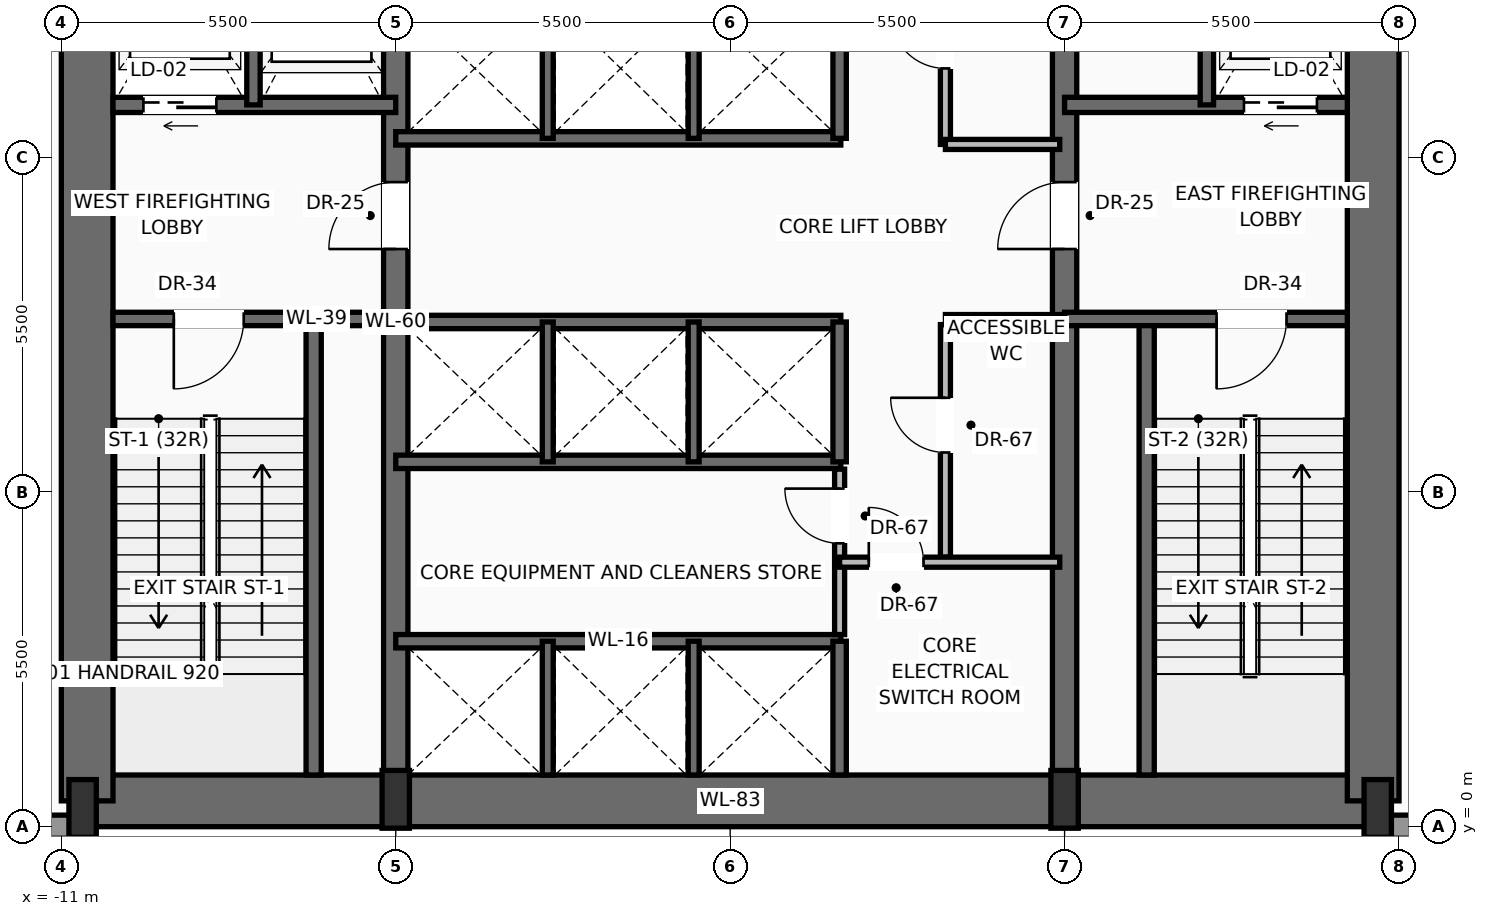
"""IFC4 building model, lengths in metres.
Left out: names, types, materials, properties, quantities, classifications, styles, units other than length and angle.
Written with IfcOpenShell. Run it as: python <this file> out.ifc"""

import sys

from ifc_helpers import new_model, si_unit, direction, frame, frame_2d, origin, origin_2d, place, context, subcontext, project, spatial, rectangle, extrude, source, transform, mapped, element, fill, save


model = new_model("IFC4")
c1 = context("Model", 3, precision=1e-05, world=origin(), true_north=direction((0.0, 1.0)))
c2 = subcontext(c1, "Body", "Model", "MODEL_VIEW")
j1 = project(units=[si_unit("LENGTHUNIT", "METRE"), si_unit("PLANEANGLEUNIT", "RADIAN")], contexts=[c1])
p1 = place(None, origin())
s1 = spatial("IfcSite", under=j1, at=p1, CompositionType="ELEMENT")
p2 = place(p1, origin())
s2 = spatial("IfcBuilding", under=s1, at=p2, CompositionType="ELEMENT")
p3 = place(p2, frame((0.0, 0.0, 16.5)))
s3 = spatial("IfcBuildingStorey", under=s2, at=p3, CompositionType="ELEMENT", Elevation=16.5)
p4 = place(p3, frame((-10.65, 0.425, 0.0), z_axis=(0.0, 0.0, 1.0), x_axis=(1.0, 0.0, 0.0)))
e1 = element("IfcWall", 1, at=p4, inside=s3, PredefinedType="SHEAR", context=c2, shape_type="SweptSolid", body=[
    extrude(rectangle(XDim=21.3, YDim=0.85, at=frame_2d((10.65, 0.0))), origin(), (0.0, 0.0, 1.0), 5.05),
])
for number, where, z_axis, x_axis in (
    (2, (-10.575, 0.425, 0.0), (0.0, 0.0, 1.0), (0.0, 1.0, 0.0)),
    (3, (10.575, 0.425, 0.0), (0.0, 0.0, 1.0), (0.0, 1.0, 0.0)),
):
    element("IfcWall", number, at=place(p3, frame(where, z_axis=z_axis, x_axis=x_axis)), inside=s3, PredefinedType="SHEAR", context=c2, shape_type="SweptSolid", body=[
        extrude(rectangle(XDim=15.75, YDim=0.85, at=frame_2d((7.875, 0.0))), origin(), (0.0, 0.0, 1.0), 5.05),
    ])
p5 = place(p3, frame((-5.5, 0.425, 0.0), z_axis=(0.0, 0.0, 1.0), x_axis=(0.0, 1.0, 0.0)))
e4 = element("IfcWall", 4, at=p5, inside=s3, PredefinedType="SHEAR", context=c2, shape_type="SweptSolid", body=[
    extrude(rectangle(XDim=15.75, YDim=0.4, at=frame_2d((7.875, 0.0))), origin(), (0.0, 0.0, 1.0), 5.05),
])
p6 = place(p5, frame((9.075, 0.0, 0.0)))
e5 = element("IfcOpeningElement", 5, at=p6, cuts=e4, PredefinedType="OPENING", context=c2, shape_type="SweptSolid", body=[
    extrude(rectangle(XDim=1.1, YDim=2.2, at=frame_2d((0.55, 1.1))), frame((0.0, 0.21, 0.0), z_axis=(0.0, -1.0, 0.0), x_axis=(1.0, 0.0, 0.0)), (0.0, 0.0, 1.0), 0.42),
])
p7 = place(p3, frame((5.5, 0.425, 0.0), z_axis=(0.0, 0.0, 1.0), x_axis=(0.0, 1.0, 0.0)))
e6 = element("IfcWall", 6, at=p7, inside=s3, PredefinedType="SHEAR", context=c2, shape_type="SweptSolid", body=[
    extrude(rectangle(XDim=15.75, YDim=0.4, at=frame_2d((7.875, 0.0))), origin(), (0.0, 0.0, 1.0), 5.05),
])
p8 = place(p7, frame((9.075, 0.0, 0.0)))
e7 = element("IfcOpeningElement", 7, at=p8, cuts=e6, PredefinedType="OPENING", context=c2, shape_type="SweptSolid", body=[
    extrude(rectangle(XDim=1.1, YDim=2.2, at=frame_2d((0.55, 1.1))), frame((0.0, 0.21, 0.0), z_axis=(0.0, -1.0, 0.0), x_axis=(1.0, 0.0, 0.0)), (0.0, 0.0, 1.0), 0.42),
])
m1 = source(origin(), c2, "Body", "SweptSolid", [
    extrude(rectangle(XDim=0.45, YDim=0.95, at=origin_2d()), origin(), (0.0, 0.0, 1.0), 5.5),
])
for number, where, z_axis, x_axis in (
    (8, (-10.65, 0.3, 0.0), (0.0, 0.0, 1.0), (1.0, 0.0, 0.0)),
    (9, (-5.5, 0.45, 0.0), (0.0, 0.0, 1.0), (1.0, 0.0, 0.0)),
    (10, (5.5, 0.45, 0.0), (0.0, 0.0, 1.0), (1.0, 0.0, 0.0)),
    (11, (10.65, 0.3, 0.0), (0.0, 0.0, 1.0), (1.0, 0.0, 0.0)),
):
    element("IfcColumn", number, at=place(p3, frame(where, z_axis=z_axis, x_axis=x_axis)), inside=s3, PredefinedType="PILASTER", context=c2, shape_type="MappedRepresentation", body=[
        mapped(m1, transform((0.0, 0.0, 0.0), scale=1.0)),
    ])
p9 = place(p3, frame((24.85, 0.0, 0.0), z_axis=(0.0, 0.0, 1.0), x_axis=(-1.0, 0.0, 0.0)))
e12 = element("IfcWall", 12, at=p9, inside=s3, PredefinedType="SOLIDWALL", context=c2, shape_type="SweptSolid", body=[
    extrude(rectangle(XDim=14.3, YDim=0.38, at=frame_2d((7.15, 0.0))), origin(), (0.0, 0.0, 1.0), 3.99),
])
p10 = place(p9, frame((6.25, 0.0, 0.95)))
e13 = element("IfcOpeningElement", 13, at=p10, cuts=e12, PredefinedType="OPENING", context=c2, shape_type="SweptSolid", body=[
    extrude(rectangle(XDim=1.8, YDim=2.4, at=frame_2d((0.9, 1.2))), frame((0.0, 0.2, 0.0), z_axis=(0.0, -1.0, 0.0), x_axis=(1.0, 0.0, 0.0)), (0.0, 0.0, 1.0), 0.4),
])
p11 = place(p3, frame((-10.55, 0.0, 0.0), z_axis=(0.0, 0.0, 1.0), x_axis=(-1.0, 0.0, 0.0)))
e14 = element("IfcWall", 14, at=p11, inside=s3, PredefinedType="SOLIDWALL", context=c2, shape_type="SweptSolid", body=[
    extrude(rectangle(XDim=14.3, YDim=0.38, at=frame_2d((7.15, 0.0))), origin(), (0.0, 0.0, 1.0), 3.99),
])
p12 = place(p11, frame((6.25, 0.0, 0.95)))
e15 = element("IfcOpeningElement", 15, at=p12, cuts=e14, PredefinedType="OPENING", context=c2, shape_type="SweptSolid", body=[
    extrude(rectangle(XDim=1.8, YDim=2.4, at=frame_2d((0.9, 1.2))), frame((0.0, 0.2, 0.0), z_axis=(0.0, -1.0, 0.0), x_axis=(1.0, 0.0, 0.0)), (0.0, 0.0, 1.0), 0.4),
])
p13 = place(p3, frame((-6.85, 0.85, 0.0), z_axis=(0.0, 0.0, 1.0), x_axis=(0.0, 1.0, 0.0)))
e16 = element("IfcWall", 16, at=p13, inside=s3, PredefinedType="SOLIDWALL", context=c2, shape_type="SweptSolid", body=[
    extrude(rectangle(XDim=7.5, YDim=0.25, at=frame_2d((3.75, 0.0))), origin(), (0.0, 0.0, 1.0), 5.05),
])
p14 = place(p3, frame((-5.5, 8.35, 0.0), z_axis=(0.0, 0.0, 1.0), x_axis=(-1.0, 0.0, 0.0)))
e17 = element("IfcWall", 17, at=p14, inside=s3, PredefinedType="SOLIDWALL", context=c2, shape_type="SweptSolid", body=[
    extrude(rectangle(XDim=4.65, YDim=0.22, at=frame_2d((2.325, 0.0))), origin(), (0.0, 0.0, 1.0), 5.05),
])
p15 = place(p14, frame((2.5, 0.0, 0.0)))
e18 = element("IfcOpeningElement", 18, at=p15, cuts=e17, PredefinedType="OPENING", context=c2, shape_type="SweptSolid", body=[
    extrude(rectangle(XDim=1.15, YDim=2.2, at=frame_2d((0.575, 1.1))), frame((0.0, 0.12, 0.0), z_axis=(0.0, -1.0, 0.0), x_axis=(1.0, 0.0, 0.0)), (0.0, 0.0, 1.0), 0.24),
])
p16 = place(p3, frame((-5.5, 11.87, 0.0), z_axis=(0.0, 0.0, 1.0), x_axis=(-1.0, 0.0, 0.0)))
e19 = element("IfcWall", 19, at=p16, inside=s3, PredefinedType="SOLIDWALL", context=c2, shape_type="SweptSolid", body=[
    extrude(rectangle(XDim=4.65, YDim=0.25, at=frame_2d((2.325, 0.0))), origin(), (0.0, 0.0, 1.0), 5.05),
])
p17 = place(p16, frame((2.95, 0.0, 0.0)))
e20 = element("IfcOpeningElement", 20, at=p17, cuts=e19, PredefinedType="OPENING", context=c2, shape_type="SweptSolid", body=[
    extrude(rectangle(XDim=1.2, YDim=2.25, at=frame_2d((0.6, 1.125))), frame((0.0, 0.135, 0.0), z_axis=(0.0, -1.0, 0.0), x_axis=(1.0, 0.0, 0.0)), (0.0, 0.0, 1.0), 0.27),
])
p18 = place(p3, frame((-7.84, 11.87, 0.0), z_axis=(0.0, 0.0, 1.0), x_axis=(0.0, 1.0, 0.0)))
e21 = element("IfcWall", 21, at=p18, inside=s3, PredefinedType="SOLIDWALL", context=c2, shape_type="SweptSolid", body=[
    extrude(rectangle(XDim=3.88, YDim=0.22, at=frame_2d((1.94, 0.0))), origin(), (0.0, 0.0, 1.0), 5.05),
])
p19 = place(p3, frame((6.85, 0.85, 0.0), z_axis=(0.0, 0.0, 1.0), x_axis=(0.0, 1.0, 0.0)))
e22 = element("IfcWall", 22, at=p19, inside=s3, PredefinedType="SOLIDWALL", context=c2, shape_type="SweptSolid", body=[
    extrude(rectangle(XDim=7.5, YDim=0.25, at=frame_2d((3.75, 0.0))), origin(), (0.0, 0.0, 1.0), 5.05),
])
p20 = place(p3, frame((10.15, 8.35, 0.0), z_axis=(0.0, 0.0, 1.0), x_axis=(-1.0, 0.0, 0.0)))
e23 = element("IfcWall", 23, at=p20, inside=s3, PredefinedType="SOLIDWALL", context=c2, shape_type="SweptSolid", body=[
    extrude(rectangle(XDim=4.65, YDim=0.22, at=frame_2d((2.325, 0.0))), origin(), (0.0, 0.0, 1.0), 5.05),
])
p21 = place(p20, frame((1.0, 0.0, 0.0)))
e24 = element("IfcOpeningElement", 24, at=p21, cuts=e23, PredefinedType="OPENING", context=c2, shape_type="SweptSolid", body=[
    extrude(rectangle(XDim=1.15, YDim=2.2, at=frame_2d((0.575, 1.1))), frame((0.0, 0.12, 0.0), z_axis=(0.0, -1.0, 0.0), x_axis=(1.0, 0.0, 0.0)), (0.0, 0.0, 1.0), 0.24),
])
p22 = place(p3, frame((10.15, 11.87, 0.0), z_axis=(0.0, 0.0, 1.0), x_axis=(-1.0, 0.0, 0.0)))
e25 = element("IfcWall", 25, at=p22, inside=s3, PredefinedType="SOLIDWALL", context=c2, shape_type="SweptSolid", body=[
    extrude(rectangle(XDim=4.65, YDim=0.25, at=frame_2d((2.325, 0.0))), origin(), (0.0, 0.0, 1.0), 5.05),
])
p23 = place(p22, frame((0.5, 0.0, 0.0)))
e26 = element("IfcOpeningElement", 26, at=p23, cuts=e25, PredefinedType="OPENING", context=c2, shape_type="SweptSolid", body=[
    extrude(rectangle(XDim=1.2, YDim=2.25, at=frame_2d((0.6, 1.125))), frame((0.0, 0.135, 0.0), z_axis=(0.0, -1.0, 0.0), x_axis=(1.0, 0.0, 0.0)), (0.0, 0.0, 1.0), 0.27),
])
p24 = place(p3, frame((7.84, 11.87, 0.0), z_axis=(0.0, 0.0, 1.0), x_axis=(0.0, 1.0, 0.0)))
e27 = element("IfcWall", 27, at=p24, inside=s3, PredefinedType="SOLIDWALL", context=c2, shape_type="SweptSolid", body=[
    extrude(rectangle(XDim=3.88, YDim=0.22, at=frame_2d((1.94, 0.0))), origin(), (0.0, 0.0, 1.0), 5.05),
])
p25 = place(p3, frame((-5.5, 3.05, 0.0), z_axis=(0.0, 0.0, 1.0), x_axis=(1.0, 0.0, 0.0)))
e28 = element("IfcWall", 28, at=p25, inside=s3, PredefinedType="SOLIDWALL", context=c2, shape_type="SweptSolid", body=[
    extrude(rectangle(XDim=7.32, YDim=0.22, at=frame_2d((3.66, 0.0))), origin(), (0.0, 0.0, 1.0), 5.05),
])
p26 = place(p3, frame((1.8, 0.85, 0.0), z_axis=(0.0, 0.0, 1.0), x_axis=(0.0, 1.0, 0.0)))
e29 = element("IfcWall", 29, at=p26, inside=s3, PredefinedType="SOLIDWALL", context=c2, shape_type="SweptSolid", body=[
    extrude(rectangle(XDim=2.2, YDim=0.22, at=frame_2d((1.1, 0.0))), origin(), (0.0, 0.0, 1.0), 5.05),
])
for number, where, z_axis, x_axis in (
    (30, (-3.0, 0.85, 0.0), (0.0, 0.0, 1.0), (0.0, 1.0, 0.0)),
    (31, (-0.6, 0.85, 0.0), (0.0, 0.0, 1.0), (0.0, 1.0, 0.0)),
):
    element("IfcWall", number, at=place(p3, frame(where, z_axis=z_axis, x_axis=x_axis)), inside=s3, PredefinedType="SOLIDWALL", context=c2, shape_type="SweptSolid", body=[
        extrude(rectangle(XDim=2.2, YDim=0.18, at=frame_2d((1.1, 0.0))), origin(), (0.0, 0.0, 1.0), 5.05),
    ])
p27 = place(p3, frame((1.8, 3.16, 0.0), z_axis=(0.0, 0.0, 1.0), x_axis=(0.0, 1.0, 0.0)))
e32 = element("IfcWall", 32, at=p27, inside=s3, PredefinedType="PARTITIONING", context=c2, shape_type="SweptSolid", body=[
    extrude(rectangle(XDim=2.72, YDim=0.165, at=frame_2d((1.36, 0.0))), origin(), (0.0, 0.0, 1.0), 5.042),
])
p28 = place(p27, frame((1.5, 0.0, 0.0)))
e33 = element("IfcOpeningElement", 33, at=p28, cuts=e32, PredefinedType="OPENING", context=c2, shape_type="SweptSolid", body=[
    extrude(rectangle(XDim=0.9, YDim=2.1, at=frame_2d((0.45, 1.05))), frame((0.0, 0.093, 0.0), z_axis=(0.0, -1.0, 0.0), x_axis=(1.0, 0.0, 0.0)), (0.0, 0.0, 1.0), 0.185),
])
p29 = place(p3, frame((3.54, 4.433, 0.0), z_axis=(0.0, 0.0, 1.0), x_axis=(0.0, 1.0, 0.0)))
e34 = element("IfcWall", 34, at=p29, inside=s3, PredefinedType="PARTITIONING", context=c2, shape_type="SweptSolid", body=[
    extrude(rectangle(XDim=3.825, YDim=0.165, at=frame_2d((1.913, 0.0))), origin(), (0.0, 0.0, 1.0), 5.042),
])
p30 = place(p29, frame((1.721, 0.0, 0.0)))
e35 = element("IfcOpeningElement", 35, at=p30, cuts=e34, PredefinedType="OPENING", context=c2, shape_type="SweptSolid", body=[
    extrude(rectangle(XDim=0.9, YDim=2.1, at=frame_2d((0.45, 1.05))), frame((0.0, 0.093, 0.0), z_axis=(0.0, -1.0, 0.0), x_axis=(1.0, 0.0, 0.0)), (0.0, 0.0, 1.0), 0.185),
])
p31 = place(p3, frame((3.54, 8.34, 0.0), z_axis=(0.0, 0.0, 1.0), x_axis=(1.0, 0.0, 0.0)))
e36 = element("IfcWall", 36, at=p31, inside=s3, PredefinedType="PARTITIONING", context=c2, shape_type="SweptSolid", body=[
    extrude(rectangle(XDim=1.88, YDim=0.165, at=frame_2d((0.94, 0.0))), origin(), (0.0, 0.0, 1.0), 5.042),
])
p32 = place(p3, frame((1.8, 4.35, 0.0), z_axis=(0.0, 0.0, 1.0), x_axis=(1.0, 0.0, 0.0)))
e37 = element("IfcWall", 37, at=p32, inside=s3, PredefinedType="PARTITIONING", context=c2, shape_type="SweptSolid", body=[
    extrude(rectangle(XDim=3.62, YDim=0.165, at=frame_2d((1.81, 0.0))), origin(), (0.0, 0.0, 1.0), 5.042),
])
p33 = place(p32, frame((0.48, 0.0, 0.0)))
e38 = element("IfcOpeningElement", 38, at=p33, cuts=e37, PredefinedType="OPENING", context=c2, shape_type="SweptSolid", body=[
    extrude(rectangle(XDim=0.9, YDim=2.1, at=frame_2d((0.45, 1.05))), frame((0.0, 0.093, 0.0), z_axis=(0.0, -1.0, 0.0), x_axis=(1.0, 0.0, 0.0)), (0.0, 0.0, 1.0), 0.185),
])
for number, where, z_axis, x_axis in (
    (39, (-5.5, 6.0, 0.0), (0.0, 0.0, 1.0), (1.0, 0.0, 0.0)),
    (40, (-5.5, 8.3, 0.0), (0.0, 0.0, 1.0), (1.0, 0.0, 0.0)),
):
    element("IfcWall", number, at=place(p3, frame(where, z_axis=z_axis, x_axis=x_axis)), inside=s3, PredefinedType="SOLIDWALL", context=c2, shape_type="SweptSolid", body=[
        extrude(rectangle(XDim=7.32, YDim=0.22, at=frame_2d((3.66, 0.0))), origin(), (0.0, 0.0, 1.0), 5.05),
    ])
p34 = place(p3, frame((1.8, 6.0, 0.0), z_axis=(0.0, 0.0, 1.0), x_axis=(0.0, 1.0, 0.0)))
e41 = element("IfcWall", 41, at=p34, inside=s3, PredefinedType="SOLIDWALL", context=c2, shape_type="SweptSolid", body=[
    extrude(rectangle(XDim=2.3, YDim=0.22, at=frame_2d((1.15, 0.0))), origin(), (0.0, 0.0, 1.0), 5.05),
])
for number, where, z_axis, x_axis in (
    (42, (-3.0, 6.0, 0.0), (0.0, 0.0, 1.0), (0.0, 1.0, 0.0)),
    (43, (-0.6, 6.0, 0.0), (0.0, 0.0, 1.0), (0.0, 1.0, 0.0)),
):
    element("IfcWall", number, at=place(p3, frame(where, z_axis=z_axis, x_axis=x_axis)), inside=s3, PredefinedType="SOLIDWALL", context=c2, shape_type="SweptSolid", body=[
        extrude(rectangle(XDim=2.3, YDim=0.18, at=frame_2d((1.15, 0.0))), origin(), (0.0, 0.0, 1.0), 5.05),
    ])
p35 = place(p3, frame((-5.5, 11.32, 0.0), z_axis=(0.0, 0.0, 1.0), x_axis=(1.0, 0.0, 0.0)))
e44 = element("IfcWall", 44, at=p35, inside=s3, PredefinedType="SOLIDWALL", context=c2, shape_type="SweptSolid", body=[
    extrude(rectangle(XDim=7.32, YDim=0.22, at=frame_2d((3.66, 0.0))), origin(), (0.0, 0.0, 1.0), 5.05),
])
p36 = place(p3, frame((1.8, 11.32, 0.0), z_axis=(0.0, 0.0, 1.0), x_axis=(0.0, 1.0, 0.0)))
e45 = element("IfcWall", 45, at=p36, inside=s3, PredefinedType="SOLIDWALL", context=c2, shape_type="SweptSolid", body=[
    extrude(rectangle(XDim=2.3, YDim=0.22, at=frame_2d((1.15, 0.0))), origin(), (0.0, 0.0, 1.0), 5.05),
])
for number, where, z_axis, x_axis in (
    (46, (-3.0, 11.32, 0.0), (0.0, 0.0, 1.0), (0.0, 1.0, 0.0)),
    (47, (-0.6, 11.32, 0.0), (0.0, 0.0, 1.0), (0.0, 1.0, 0.0)),
):
    element("IfcWall", number, at=place(p3, frame(where, z_axis=z_axis, x_axis=x_axis)), inside=s3, PredefinedType="SOLIDWALL", context=c2, shape_type="SweptSolid", body=[
        extrude(rectangle(XDim=2.3, YDim=0.18, at=frame_2d((1.15, 0.0))), origin(), (0.0, 0.0, 1.0), 5.05),
    ])
p37 = place(p3, frame((3.54, 11.22, 0.0), z_axis=(0.0, 0.0, 1.0), x_axis=(0.0, 1.0, 0.0)))
e48 = element("IfcWall", 48, at=p37, inside=s3, PredefinedType="PARTITIONING", context=c2, shape_type="SweptSolid", body=[
    extrude(rectangle(XDim=4.53, YDim=0.165, at=frame_2d((2.265, 0.0))), origin(), (0.0, 0.0, 1.0), 5.042),
])
p38 = place(p37, frame((1.25, 0.0, 0.0)))
e49 = element("IfcOpeningElement", 49, at=p38, cuts=e48, PredefinedType="OPENING", context=c2, shape_type="SweptSolid", body=[
    extrude(rectangle(XDim=0.9, YDim=2.1, at=frame_2d((0.45, 1.05))), frame((0.0, 0.093, 0.0), z_axis=(0.0, -1.0, 0.0), x_axis=(1.0, 0.0, 0.0)), (0.0, 0.0, 1.0), 0.185),
])
p39 = place(p3, frame((3.54, 11.22, 0.0), z_axis=(0.0, 0.0, 1.0), x_axis=(1.0, 0.0, 0.0)))
e50 = element("IfcWall", 50, at=p39, inside=s3, PredefinedType="PARTITIONING", context=c2, shape_type="SweptSolid", body=[
    extrude(rectangle(XDim=1.88, YDim=0.165, at=frame_2d((0.94, 0.0))), origin(), (0.0, 0.0, 1.0), 5.042),
])
m2 = source(origin(), c2, "Body", "SweptSolid", [
    extrude(rectangle(XDim=1.15, YDim=2.2, at=frame_2d((0.575, 1.1))), frame((0.0, 0.025, 0.0), z_axis=(0.0, -1.0, 0.0), x_axis=(1.0, 0.0, 0.0)), (0.0, 0.0, 1.0), 0.05),
])
p40 = place(p15, origin())
e51 = element("IfcDoor", 51, at=p40, inside=s3, OperationType="SINGLE_SWING_RIGHT", PredefinedType="DOOR", context=c2, shape_type="MappedRepresentation", body=[
    mapped(m2, transform((0.0, 0.0, 0.0), scale=1.0)),
])
fill(e18, e51)
m3 = source(origin(), c2, "Body", "SweptSolid", [
    extrude(rectangle(XDim=1.1, YDim=2.2, at=frame_2d((0.55, 1.1))), frame((0.0, 0.025, 0.0), z_axis=(0.0, -1.0, 0.0), x_axis=(1.0, 0.0, 0.0)), (0.0, 0.0, 1.0), 0.05),
])
p41 = place(p6, origin())
e52 = element("IfcDoor", 52, at=p41, inside=s3, OperationType="SINGLE_SWING_LEFT", PredefinedType="DOOR", context=c2, shape_type="MappedRepresentation", body=[
    mapped(m3, transform((0.0, 0.0, 0.0), scale=1.0)),
])
fill(e5, e52)
m4 = source(origin(), c2, "Body", "SweptSolid", [
    extrude(rectangle(XDim=1.2, YDim=2.25, at=frame_2d((0.6, 1.125))), frame((0.0, 0.025, 0.0), z_axis=(0.0, -1.0, 0.0), x_axis=(1.0, 0.0, 0.0)), (0.0, 0.0, 1.0), 0.05),
])
p42 = place(p17, origin())
e53 = element("IfcDoor", 53, at=p42, inside=s3, OperationType="SLIDING_TO_LEFT", PredefinedType="DOOR", context=c2, shape_type="MappedRepresentation", body=[
    mapped(m4, transform((0.0, 0.0, 0.0), scale=1.0)),
])
fill(e20, e53)
p43 = place(p21, origin())
e54 = element("IfcDoor", 54, at=p43, inside=s3, OperationType="SINGLE_SWING_RIGHT", PredefinedType="DOOR", context=c2, shape_type="MappedRepresentation", body=[
    mapped(m2, transform((0.0, 0.0, 0.0), scale=1.0)),
])
fill(e24, e54)
p44 = place(p8, origin())
e55 = element("IfcDoor", 55, at=p44, inside=s3, OperationType="SINGLE_SWING_LEFT", PredefinedType="DOOR", context=c2, shape_type="MappedRepresentation", body=[
    mapped(m3, transform((0.0, 0.0, 0.0), scale=1.0)),
])
fill(e7, e55)
p45 = place(p23, origin())
e56 = element("IfcDoor", 56, at=p45, inside=s3, OperationType="SLIDING_TO_RIGHT", PredefinedType="DOOR", context=c2, shape_type="MappedRepresentation", body=[
    mapped(m4, transform((0.0, 0.0, 0.0), scale=1.0)),
])
fill(e26, e56)
m5 = source(origin(), c2, "Body", "SweptSolid", [
    extrude(rectangle(XDim=0.9, YDim=2.1, at=frame_2d((0.45, 1.05))), frame((0.0, 0.025, 0.0), z_axis=(0.0, -1.0, 0.0), x_axis=(1.0, 0.0, 0.0)), (0.0, 0.0, 1.0), 0.05),
])
p46 = place(p28, origin())
e57 = element("IfcDoor", 57, at=p46, inside=s3, OperationType="SINGLE_SWING_RIGHT", PredefinedType="DOOR", context=c2, shape_type="MappedRepresentation", body=[
    mapped(m5, transform((0.0, 0.0, 0.0), scale=1.0)),
])
fill(e33, e57)
p47 = place(p33, origin())
e58 = element("IfcDoor", 58, at=p47, inside=s3, OperationType="SINGLE_SWING_LEFT", PredefinedType="DOOR", context=c2, shape_type="MappedRepresentation", body=[
    mapped(m5, transform((0.0, 0.0, 0.0), scale=1.0)),
])
fill(e38, e58)
p48 = place(p30, origin())
e59 = element("IfcDoor", 59, at=p48, inside=s3, OperationType="SINGLE_SWING_RIGHT", PredefinedType="DOOR", context=c2, shape_type="MappedRepresentation", body=[
    mapped(m5, transform((0.0, 0.0, 0.0), scale=1.0)),
])
fill(e35, e59)
p49 = place(p38, origin())
e60 = element("IfcDoor", 60, at=p49, inside=s3, OperationType="SINGLE_SWING_RIGHT", PredefinedType="DOOR", context=c2, shape_type="MappedRepresentation", body=[
    mapped(m5, transform((0.0, 0.0, 0.0), scale=1.0)),
])
fill(e49, e60)
save(model, sys.argv[1])
